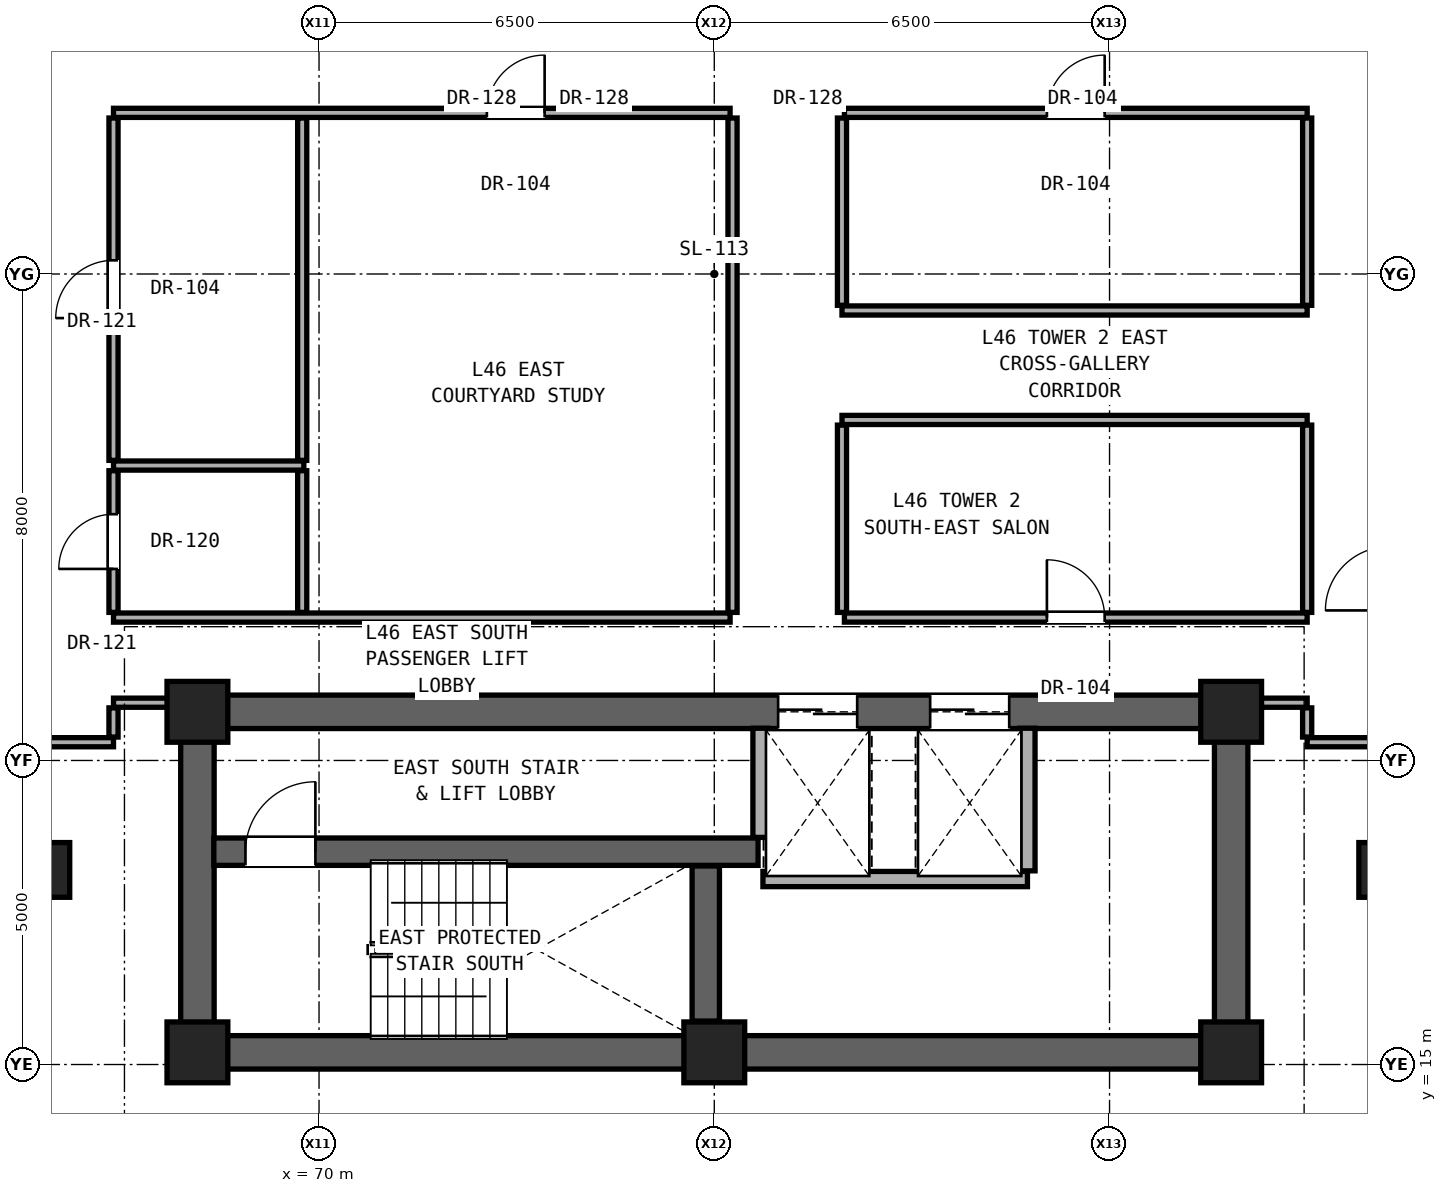
"""IFC4 building model, lengths in metres.
Left out: names, types, materials, properties, quantities, classifications, styles, units other than length and angle.
Written with IfcOpenShell. Run it as: python <this file> out.ifc"""

import sys

from ifc_helpers import new_model, si_unit, direction, frame, frame_2d, origin, origin_2d, place, context, subcontext, project, spatial, rectangle, extrude, element, fill, save


model = new_model("IFC4")
c1 = context("Model", 3, precision=1e-05, world=origin(), true_north=direction((0.0, 1.0)))
c2 = subcontext(c1, "Body", "Model", "MODEL_VIEW")
j1 = project(units=[si_unit("LENGTHUNIT", "METRE"), si_unit("PLANEANGLEUNIT", "RADIAN")], contexts=[c1])
p1 = place(None, origin())
s1 = spatial("IfcSite", under=j1, at=p1, CompositionType="ELEMENT")
p2 = place(p1, origin())
s2 = spatial("IfcBuilding", under=s1, at=p2, CompositionType="ELEMENT")
p3 = place(p2, frame((0.0, 0.0, 164.15)))
s3 = spatial("IfcBuildingStorey", under=s2, at=p3, CompositionType="ELEMENT", Elevation=164.15)
for number, where, z_axis, x_axis in (
    (1, (68.0, 15.2, 0.0), (0.0, 0.0, 1.0), (1.0, 0.0, 0.0)),
    (2, (76.5, 15.2, 0.0), (0.0, 0.0, 1.0), (1.0, 0.0, 0.0)),
    (3, (85.0, 15.2, 0.0), (0.0, 0.0, 1.0), (1.0, 0.0, 0.0)),
    (4, (68.0, 20.8, 0.0), (0.0, 0.0, 1.0), (1.0, 0.0, 0.0)),
    (5, (85.0, 20.8, 0.0), (0.0, 0.0, 1.0), (1.0, 0.0, 0.0)),
):
    element("IfcColumn", number, at=place(p3, frame(where, z_axis=z_axis, x_axis=x_axis)), inside=s3, PredefinedType="COLUMN", context=c2, shape_type="SweptSolid", body=[
        extrude(rectangle(XDim=1.0, YDim=1.0, at=origin_2d()), origin(), (0.0, 0.0, 1.0), 3.25),
    ])
for number, where, z_axis, x_axis in (
    (6, (65.6, 18.2, 0.0), (0.0, 0.0, 1.0), (1.0, 0.0, 0.0)),
    (7, (87.4, 18.2, 0.0), (0.0, 0.0, 1.0), (1.0, 0.0, 0.0)),
):
    element("IfcColumn", number, at=place(p3, frame(where, z_axis=z_axis, x_axis=x_axis)), inside=s3, PredefinedType="PILASTER", context=c2, shape_type="SweptSolid", body=[
        extrude(rectangle(XDim=0.6, YDim=0.9, at=origin_2d()), origin(), (0.0, 0.0, 1.0), 3.25),
    ])
p4 = place(p3, frame((68.0, 15.2, 0.0), z_axis=(0.0, 0.0, 1.0), x_axis=(1.0, 0.0, 0.0)))
e8 = element("IfcWall", 8, at=p4, inside=s3, PredefinedType="SHEAR", context=c2, shape_type="SweptSolid", body=[
    extrude(rectangle(XDim=17.0, YDim=0.55, at=frame_2d((8.5, 0.0))), origin(), (0.0, 0.0, 1.0), 3.05),
])
for number, where, z_axis, x_axis in (
    (9, (68.0, 15.2, 0.0), (0.0, 0.0, 1.0), (0.0, 1.0, 0.0)),
    (10, (85.0, 15.2, 0.0), (0.0, 0.0, 1.0), (0.0, 1.0, 0.0)),
):
    element("IfcWall", number, at=place(p3, frame(where, z_axis=z_axis, x_axis=x_axis)), inside=s3, PredefinedType="SHEAR", context=c2, shape_type="SweptSolid", body=[
        extrude(rectangle(XDim=5.6, YDim=0.55, at=frame_2d((2.8, 0.0))), origin(), (0.0, 0.0, 1.0), 3.05),
    ])
p5 = place(p3, frame((68.0, 20.8, 0.0), z_axis=(0.0, 0.0, 1.0), x_axis=(1.0, 0.0, 0.0)))
e11 = element("IfcWall", 11, at=p5, inside=s3, PredefinedType="SHEAR", context=c2, shape_type="SweptSolid", body=[
    extrude(rectangle(XDim=17.0, YDim=0.55, at=frame_2d((8.5, 0.0))), origin(), (0.0, 0.0, 1.0), 3.05),
])
p6 = place(p5, frame((9.55, 0.0, 0.0)))
e12 = element("IfcOpeningElement", 12, at=p6, cuts=e11, PredefinedType="OPENING", context=c2, shape_type="SweptSolid", body=[
    extrude(rectangle(XDim=1.3, YDim=2.3, at=frame_2d((0.65, 1.15))), frame((0.0, 0.285, 0.0), z_axis=(0.0, -1.0, 0.0), x_axis=(1.0, 0.0, 0.0)), (0.0, 0.0, 1.0), 0.57),
])
p7 = place(p5, frame((12.05, 0.0, 0.0)))
e13 = element("IfcOpeningElement", 13, at=p7, cuts=e11, PredefinedType="OPENING", context=c2, shape_type="SweptSolid", body=[
    extrude(rectangle(XDim=1.3, YDim=2.3, at=frame_2d((0.65, 1.15))), frame((0.0, 0.285, 0.0), z_axis=(0.0, -1.0, 0.0), x_axis=(1.0, 0.0, 0.0)), (0.0, 0.0, 1.0), 0.57),
])
p8 = place(p3, frame((77.3, 18.05, 0.0), z_axis=(0.0, 0.0, 1.0), x_axis=(1.0, 0.0, 0.0)))
e14 = element("IfcWall", 14, at=p8, inside=s3, PredefinedType="SOLIDWALL", context=c2, shape_type="SweptSolid", body=[
    extrude(rectangle(XDim=4.35, YDim=0.25, at=frame_2d((2.175, 0.0))), origin(), (0.0, 0.0, 1.0), 3.05),
])
p9 = place(p3, frame((68.27, 18.5, 0.0), z_axis=(0.0, 0.0, 1.0), x_axis=(1.0, 0.0, 0.0)))
e15 = element("IfcWall", 15, at=p9, inside=s3, PredefinedType="SHEAR", context=c2, shape_type="SweptSolid", body=[
    extrude(rectangle(XDim=8.95, YDim=0.45, at=frame_2d((4.475, 0.0))), origin(), (0.0, 0.0, 1.0), 3.05),
])
p10 = place(p9, frame((0.52, 0.0, 0.0)))
e16 = element("IfcOpeningElement", 16, at=p10, cuts=e15, PredefinedType="OPENING", context=c2, shape_type="SweptSolid", body=[
    extrude(rectangle(XDim=1.15, YDim=2.2, at=frame_2d((0.575, 1.1))), frame((0.0, 0.235, 0.0), z_axis=(0.0, -1.0, 0.0), x_axis=(1.0, 0.0, 0.0)), (0.0, 0.0, 1.0), 0.47),
])
p11 = place(p3, frame((65.25, 20.3, 0.0), z_axis=(0.0, 0.0, 1.0), x_axis=(1.0, 0.0, 0.0)))
e17 = element("IfcWall", 17, at=p11, inside=s3, PredefinedType="PARTITIONING", context=c2, shape_type="SweptSolid", body=[
    extrude(rectangle(XDim=1.37, YDim=0.15, at=frame_2d((0.685, 0.0))), origin(), (0.0, 0.0, 1.0), 3.05),
])
p12 = place(p3, frame((86.25, 20.3, 0.0), z_axis=(0.0, 0.0, 1.0), x_axis=(1.0, 0.0, 0.0)))
e18 = element("IfcWall", 18, at=p12, inside=s3, PredefinedType="PARTITIONING", context=c2, shape_type="SweptSolid", body=[
    extrude(rectangle(XDim=1.35, YDim=0.15, at=frame_2d((0.675, 0.0))), origin(), (0.0, 0.0, 1.0), 3.05),
])
p13 = place(p3, frame((66.62, 20.95, 0.0), z_axis=(0.0, 0.0, 1.0), x_axis=(1.0, 0.0, 0.0)))
e19 = element("IfcWall", 19, at=p13, inside=s3, PredefinedType="PARTITIONING", context=c2, shape_type="SweptSolid", body=[
    extrude(rectangle(XDim=1.11, YDim=0.15, at=frame_2d((0.555, 0.0))), origin(), (0.0, 0.0, 1.0), 2.442),
])
p14 = place(p3, frame((85.27, 20.95, 0.0), z_axis=(0.0, 0.0, 1.0), x_axis=(1.0, 0.0, 0.0)))
e20 = element("IfcWall", 20, at=p14, inside=s3, PredefinedType="PARTITIONING", context=c2, shape_type="SweptSolid", body=[
    extrude(rectangle(XDim=0.98, YDim=0.15, at=frame_2d((0.49, 0.0))), origin(), (0.0, 0.0, 1.0), 2.442),
])
p15 = place(p3, frame((66.62, 22.35, 0.0), z_axis=(0.0, 0.0, 1.0), x_axis=(1.0, 0.0, 0.0)))
e21 = element("IfcWall", 21, at=p15, inside=s3, PredefinedType="PARTITIONING", context=c2, shape_type="SweptSolid", body=[
    extrude(rectangle(XDim=10.14, YDim=0.15, at=frame_2d((5.07, 0.0))), origin(), (0.0, 0.0, 1.0), 2.186),
])
p16 = place(p3, frame((78.64, 22.35, 0.0), z_axis=(0.0, 0.0, 1.0), x_axis=(1.0, 0.0, 0.0)))
e22 = element("IfcWall", 22, at=p16, inside=s3, PredefinedType="PARTITIONING", context=c2, shape_type="SweptSolid", body=[
    extrude(rectangle(XDim=7.61, YDim=0.15, at=frame_2d((3.805, 0.0))), origin(), (0.0, 0.0, 1.0), 2.186),
])
p17 = place(p16, frame((3.33, 0.0, 0.0)))
e23 = element("IfcOpeningElement", 23, at=p17, cuts=e22, PredefinedType="OPENING", context=c2, shape_type="SweptSolid", body=[
    extrude(rectangle(XDim=0.95, YDim=2.15, at=frame_2d((0.475, 1.075))), frame((0.0, 0.085, 0.0), z_axis=(0.0, -1.0, 0.0), x_axis=(1.0, 0.0, 0.0)), (0.0, 0.0, 1.0), 0.17),
])
p18 = place(p3, frame((66.62, 24.85, 0.0), z_axis=(0.0, 0.0, 1.0), x_axis=(1.0, 0.0, 0.0)))
e24 = element("IfcWall", 24, at=p18, inside=s3, PredefinedType="PARTITIONING", context=c2, shape_type="SweptSolid", body=[
    extrude(rectangle(XDim=3.13, YDim=0.15, at=frame_2d((1.565, 0.0))), origin(), (0.0, 0.0, 1.0), 2.186),
])
for number, where, z_axis, x_axis in (
    (25, (78.6, 25.6, 0.0), (0.0, 0.0, 1.0), (1.0, 0.0, 0.0)),
    (26, (78.6, 27.4, 0.0), (0.0, 0.0, 1.0), (1.0, 0.0, 0.0)),
):
    element("IfcWall", number, at=place(p3, frame(where, z_axis=z_axis, x_axis=x_axis)), inside=s3, PredefinedType="PARTITIONING", context=c2, shape_type="SweptSolid", body=[
        extrude(rectangle(XDim=7.65, YDim=0.15, at=frame_2d((3.825, 0.0))), origin(), (0.0, 0.0, 1.0), 2.186),
    ])
p19 = place(p3, frame((66.62, 30.65, 0.0), z_axis=(0.0, 0.0, 1.0), x_axis=(1.0, 0.0, 0.0)))
e27 = element("IfcWall", 27, at=p19, inside=s3, PredefinedType="PARTITIONING", context=c2, shape_type="SweptSolid", body=[
    extrude(rectangle(XDim=10.14, YDim=0.15, at=frame_2d((5.07, 0.0))), origin(), (0.0, 0.0, 1.0), 2.186),
])
p20 = place(p19, frame((6.14, 0.0, 0.0)))
e28 = element("IfcOpeningElement", 28, at=p20, cuts=e27, PredefinedType="OPENING", context=c2, shape_type="SweptSolid", body=[
    extrude(rectangle(XDim=0.95, YDim=2.15, at=frame_2d((0.475, 1.075))), frame((0.0, 0.085, 0.0), z_axis=(0.0, -1.0, 0.0), x_axis=(1.0, 0.0, 0.0)), (0.0, 0.0, 1.0), 0.17),
])
p21 = place(p3, frame((78.64, 30.65, 0.0), z_axis=(0.0, 0.0, 1.0), x_axis=(1.0, 0.0, 0.0)))
e29 = element("IfcWall", 29, at=p21, inside=s3, PredefinedType="PARTITIONING", context=c2, shape_type="SweptSolid", body=[
    extrude(rectangle(XDim=7.61, YDim=0.15, at=frame_2d((3.805, 0.0))), origin(), (0.0, 0.0, 1.0), 2.186),
])
p22 = place(p21, frame((3.33, 0.0, 0.0)))
e30 = element("IfcOpeningElement", 30, at=p22, cuts=e29, PredefinedType="OPENING", context=c2, shape_type="SweptSolid", body=[
    extrude(rectangle(XDim=0.95, YDim=2.15, at=frame_2d((0.475, 1.075))), frame((0.0, 0.085, 0.0), z_axis=(0.0, -1.0, 0.0), x_axis=(1.0, 0.0, 0.0)), (0.0, 0.0, 1.0), 0.17),
])
p23 = place(p3, frame((66.62, 20.385, 0.0), z_axis=(0.0, 0.0, 1.0), x_axis=(0.0, 1.0, 0.0)))
e31 = element("IfcWall", 31, at=p23, inside=s3, PredefinedType="PARTITIONING", context=c2, shape_type="SweptSolid", body=[
    extrude(rectangle(XDim=0.48, YDim=0.15, at=frame_2d((0.24, 0.0))), origin(), (0.0, 0.0, 1.0), 2.442),
])
p24 = place(p3, frame((66.62, 22.435, 0.0), z_axis=(0.0, 0.0, 1.0), x_axis=(0.0, 1.0, 0.0)))
e32 = element("IfcWall", 32, at=p24, inside=s3, PredefinedType="PARTITIONING", context=c2, shape_type="SweptSolid", body=[
    extrude(rectangle(XDim=2.33, YDim=0.15, at=frame_2d((1.165, 0.0))), origin(), (0.0, 0.0, 1.0), 3.05),
])
p25 = place(p24, frame((0.715, 0.0, 0.0)))
e33 = element("IfcOpeningElement", 33, at=p25, cuts=e32, PredefinedType="OPENING", context=c2, shape_type="SweptSolid", body=[
    extrude(rectangle(XDim=0.9, YDim=2.1, at=frame_2d((0.45, 1.05))), frame((0.0, 0.085, 0.0), z_axis=(0.0, -1.0, 0.0), x_axis=(1.0, 0.0, 0.0)), (0.0, 0.0, 1.0), 0.17),
])
p26 = place(p3, frame((66.62, 24.935, 0.0), z_axis=(0.0, 0.0, 1.0), x_axis=(0.0, 1.0, 0.0)))
e34 = element("IfcWall", 34, at=p26, inside=s3, PredefinedType="PARTITIONING", context=c2, shape_type="SweptSolid", body=[
    extrude(rectangle(XDim=5.63, YDim=0.15, at=frame_2d((2.815, 0.0))), origin(), (0.0, 0.0, 1.0), 2.346),
])
p27 = place(p26, frame((2.34, 0.0, 0.0)))
e35 = element("IfcOpeningElement", 35, at=p27, cuts=e34, PredefinedType="OPENING", context=c2, shape_type="SweptSolid", body=[
    extrude(rectangle(XDim=0.95, YDim=2.15, at=frame_2d((0.475, 1.075))), frame((0.0, 0.085, 0.0), z_axis=(0.0, -1.0, 0.0), x_axis=(1.0, 0.0, 0.0)), (0.0, 0.0, 1.0), 0.17),
])
p28 = place(p3, frame((69.723, 22.435, 0.0), z_axis=(0.0, 0.0, 1.0), x_axis=(0.0, 1.0, 0.0)))
e36 = element("IfcWall", 36, at=p28, inside=s3, PredefinedType="PARTITIONING", context=c2, shape_type="SweptSolid", body=[
    extrude(rectangle(XDim=2.33, YDim=0.15, at=frame_2d((1.165, 0.0))), origin(), (0.0, 0.0, 1.0), 3.05),
])
p29 = place(p3, frame((69.723, 24.935, 0.0), z_axis=(0.0, 0.0, 1.0), x_axis=(0.0, 1.0, 0.0)))
e37 = element("IfcWall", 37, at=p29, inside=s3, PredefinedType="PARTITIONING", context=c2, shape_type="SweptSolid", body=[
    extrude(rectangle(XDim=5.63, YDim=0.15, at=frame_2d((2.815, 0.0))), origin(), (0.0, 0.0, 1.0), 2.186),
])
p30 = place(p3, frame((76.36, 15.715, 0.0), z_axis=(0.0, 0.0, 1.0), x_axis=(0.0, 1.0, 0.0)))
e38 = element("IfcWall", 38, at=p30, inside=s3, PredefinedType="SHEAR", context=c2, shape_type="SweptSolid", body=[
    extrude(rectangle(XDim=2.55, YDim=0.45, at=frame_2d((1.275, 0.0))), origin(), (0.0, 0.0, 1.0), 3.05),
])
p31 = place(p3, frame((76.8, 22.435, 0.0), z_axis=(0.0, 0.0, 1.0), x_axis=(0.0, 1.0, 0.0)))
e39 = element("IfcWall", 39, at=p31, inside=s3, PredefinedType="PARTITIONING", context=c2, shape_type="SweptSolid", body=[
    extrude(rectangle(XDim=8.13, YDim=0.15, at=frame_2d((4.065, 0.0))), origin(), (0.0, 0.0, 1.0), 2.186),
])
p32 = place(p3, frame((77.26, 18.735, 0.0), z_axis=(0.0, 0.0, 1.0), x_axis=(0.0, 1.0, 0.0)))
e40 = element("IfcWall", 40, at=p32, inside=s3, PredefinedType="SOLIDWALL", context=c2, shape_type="SweptSolid", body=[
    extrude(rectangle(XDim=1.795, YDim=0.25, at=frame_2d((0.897, 0.0))), origin(), (0.0, 0.0, 1.0), 3.05),
])
p33 = place(p3, frame((78.6, 22.435, 0.0), z_axis=(0.0, 0.0, 1.0), x_axis=(0.0, 1.0, 0.0)))
e41 = element("IfcWall", 41, at=p33, inside=s3, PredefinedType="PARTITIONING", context=c2, shape_type="SweptSolid", body=[
    extrude(rectangle(XDim=3.08, YDim=0.15, at=frame_2d((1.54, 0.0))), origin(), (0.0, 0.0, 1.0), 3.05),
])
p34 = place(p3, frame((78.6, 27.485, 0.0), z_axis=(0.0, 0.0, 1.0), x_axis=(0.0, 1.0, 0.0)))
e42 = element("IfcWall", 42, at=p34, inside=s3, PredefinedType="PARTITIONING", context=c2, shape_type="SweptSolid", body=[
    extrude(rectangle(XDim=3.08, YDim=0.15, at=frame_2d((1.54, 0.0))), origin(), (0.0, 0.0, 1.0), 2.186),
])
p35 = place(p3, frame((81.65, 18.185, 0.0), z_axis=(0.0, 0.0, 1.0), x_axis=(0.0, 1.0, 0.0)))
e43 = element("IfcWall", 43, at=p35, inside=s3, PredefinedType="SOLIDWALL", context=c2, shape_type="SweptSolid", body=[
    extrude(rectangle(XDim=2.345, YDim=0.25, at=frame_2d((1.172, 0.0))), origin(), (0.0, 0.0, 1.0), 3.05),
])
p36 = place(p3, frame((86.25, 20.385, 0.0), z_axis=(0.0, 0.0, 1.0), x_axis=(0.0, 1.0, 0.0)))
e44 = element("IfcWall", 44, at=p36, inside=s3, PredefinedType="PARTITIONING", context=c2, shape_type="SweptSolid", body=[
    extrude(rectangle(XDim=0.48, YDim=0.15, at=frame_2d((0.24, 0.0))), origin(), (0.0, 0.0, 1.0), 2.442),
])
p37 = place(p3, frame((86.25, 22.435, 0.0), z_axis=(0.0, 0.0, 1.0), x_axis=(0.0, 1.0, 0.0)))
e45 = element("IfcWall", 45, at=p37, inside=s3, PredefinedType="PARTITIONING", context=c2, shape_type="SweptSolid", body=[
    extrude(rectangle(XDim=3.08, YDim=0.15, at=frame_2d((1.54, 0.0))), origin(), (0.0, 0.0, 1.0), 3.05),
])
p38 = place(p3, frame((86.25, 27.485, 0.0), z_axis=(0.0, 0.0, 1.0), x_axis=(0.0, 1.0, 0.0)))
e46 = element("IfcWall", 46, at=p38, inside=s3, PredefinedType="PARTITIONING", context=c2, shape_type="SweptSolid", body=[
    extrude(rectangle(XDim=3.08, YDim=0.15, at=frame_2d((1.54, 0.0))), origin(), (0.0, 0.0, 1.0), 2.346),
])
p39 = place(p10, origin())
e47 = element("IfcDoor", 47, at=p39, inside=s3, OperationType="SINGLE_SWING_RIGHT", PredefinedType="DOOR", context=c2, shape_type="SweptSolid", body=[
    extrude(rectangle(XDim=1.15, YDim=2.2, at=frame_2d((0.575, 1.1))), frame((0.0, 0.025, 0.0), z_axis=(0.0, -1.0, 0.0), x_axis=(1.0, 0.0, 0.0)), (0.0, 0.0, 1.0), 0.05),
])
fill(e16, e47)
p40 = place(p25, origin())
e48 = element("IfcDoor", 48, at=p40, inside=s3, OperationType="SINGLE_SWING_LEFT", PredefinedType="DOOR", context=c2, shape_type="SweptSolid", body=[
    extrude(rectangle(XDim=0.9, YDim=2.1, at=frame_2d((0.45, 1.05))), frame((0.0, 0.025, 0.0), z_axis=(0.0, -1.0, 0.0), x_axis=(1.0, 0.0, 0.0)), (0.0, 0.0, 1.0), 0.05),
])
fill(e33, e48)
p41 = place(p27, origin())
e49 = element("IfcDoor", 49, at=p41, inside=s3, OperationType="SINGLE_SWING_LEFT", PredefinedType="DOOR", context=c2, shape_type="SweptSolid", body=[
    extrude(rectangle(XDim=0.95, YDim=2.15, at=frame_2d((0.475, 1.075))), frame((0.0, 0.025, 0.0), z_axis=(0.0, -1.0, 0.0), x_axis=(1.0, 0.0, 0.0)), (0.0, 0.0, 1.0), 0.05),
])
fill(e35, e49)
p42 = place(p20, origin())
e50 = element("IfcDoor", 50, at=p42, inside=s3, OperationType="SINGLE_SWING_RIGHT", PredefinedType="DOOR", context=c2, shape_type="SweptSolid", body=[
    extrude(rectangle(XDim=0.95, YDim=2.15, at=frame_2d((0.475, 1.075))), frame((0.0, 0.025, 0.0), z_axis=(0.0, -1.0, 0.0), x_axis=(1.0, 0.0, 0.0)), (0.0, 0.0, 1.0), 0.05),
])
fill(e28, e50)
p43 = place(p17, origin())
e51 = element("IfcDoor", 51, at=p43, inside=s3, OperationType="SINGLE_SWING_LEFT", PredefinedType="DOOR", context=c2, shape_type="SweptSolid", body=[
    extrude(rectangle(XDim=0.95, YDim=2.15, at=frame_2d((0.475, 1.075))), frame((0.0, 0.025, 0.0), z_axis=(0.0, -1.0, 0.0), x_axis=(1.0, 0.0, 0.0)), (0.0, 0.0, 1.0), 0.05),
])
fill(e23, e51)
p44 = place(p22, origin())
e52 = element("IfcDoor", 52, at=p44, inside=s3, OperationType="SINGLE_SWING_RIGHT", PredefinedType="DOOR", context=c2, shape_type="SweptSolid", body=[
    extrude(rectangle(XDim=0.95, YDim=2.15, at=frame_2d((0.475, 1.075))), frame((0.0, 0.025, 0.0), z_axis=(0.0, -1.0, 0.0), x_axis=(1.0, 0.0, 0.0)), (0.0, 0.0, 1.0), 0.05),
])
fill(e30, e52)
p45 = place(p6, origin())
e53 = element("IfcDoor", 53, at=p45, inside=s3, OperationType="DOUBLE_DOOR_SLIDING", PredefinedType="DOOR", context=c2, shape_type="SweptSolid", body=[
    extrude(rectangle(XDim=1.3, YDim=2.3, at=frame_2d((0.65, 1.15))), frame((0.0, 0.025, 0.0), z_axis=(0.0, -1.0, 0.0), x_axis=(1.0, 0.0, 0.0)), (0.0, 0.0, 1.0), 0.05),
])
fill(e12, e53)
p46 = place(p7, origin())
e54 = element("IfcDoor", 54, at=p46, inside=s3, OperationType="DOUBLE_DOOR_SLIDING", PredefinedType="DOOR", context=c2, shape_type="SweptSolid", body=[
    extrude(rectangle(XDim=1.3, YDim=2.3, at=frame_2d((0.65, 1.15))), frame((0.0, 0.025, 0.0), z_axis=(0.0, -1.0, 0.0), x_axis=(1.0, 0.0, 0.0)), (0.0, 0.0, 1.0), 0.05),
])
fill(e13, e54)
save(model, sys.argv[1])
